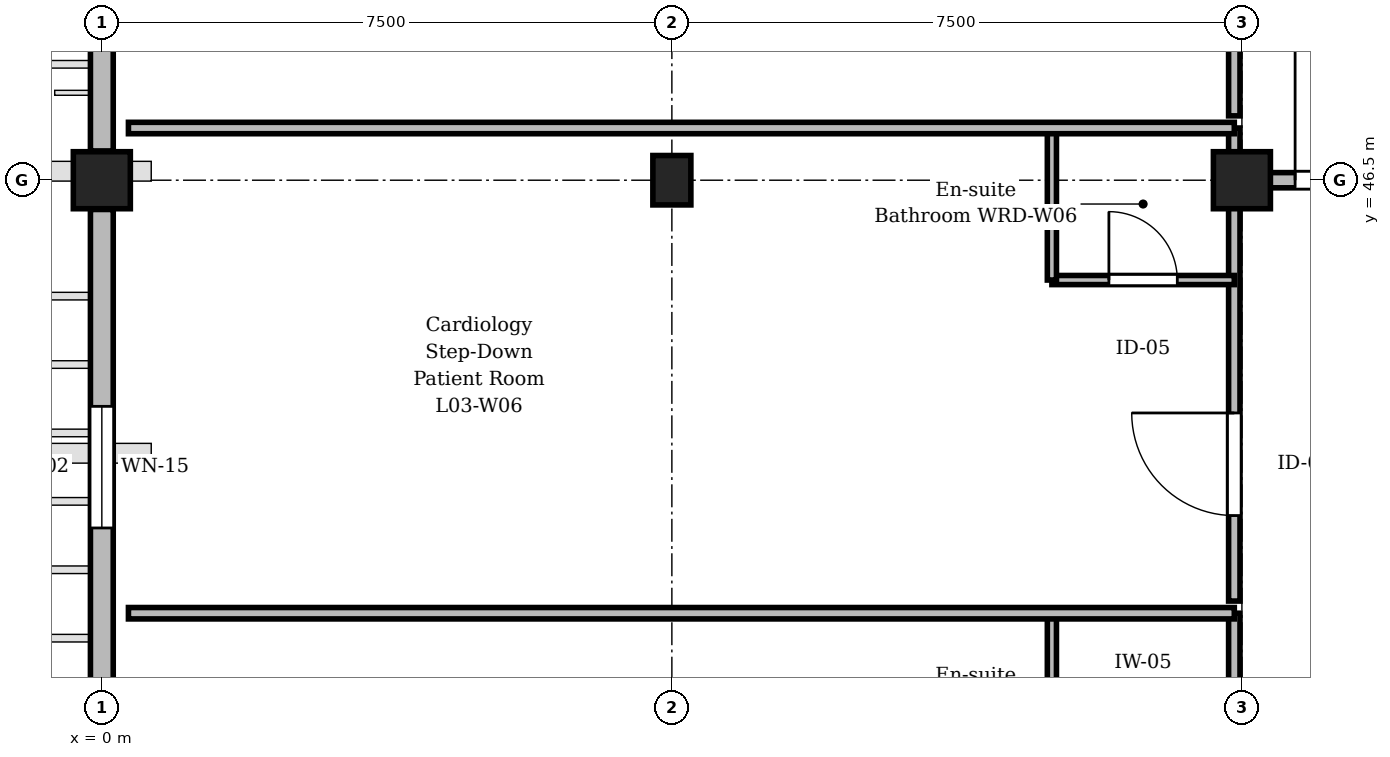
"""IFC4 building model, lengths in metres.
Left out: names, types, materials, properties, quantities, classifications, styles, units other than length and angle.
Written with IfcOpenShell. Run it as: python <this file> out.ifc"""

import sys

from ifc_helpers import new_model, si_unit, direction, frame, frame_2d, origin, origin_2d, place, context, subcontext, project, spatial, rectangle, extrude, element, fill, save


model = new_model("IFC4")
c1 = context("Model", 3, precision=1e-05, world=origin(), true_north=direction((0.0, 1.0)))
c2 = subcontext(c1, "Body", "Model", "MODEL_VIEW")
j1 = project(units=[si_unit("LENGTHUNIT", "METRE"), si_unit("PLANEANGLEUNIT", "RADIAN")], contexts=[c1])
p1 = place(None, origin())
s1 = spatial("IfcSite", under=j1, at=p1, CompositionType="ELEMENT")
p2 = place(p1, origin())
s2 = spatial("IfcBuilding", under=s1, at=p2, CompositionType="ELEMENT")
p3 = place(p2, frame((0.0, 0.0, 14.1)))
s3 = spatial("IfcBuildingStorey", under=s2, at=p3, CompositionType="ELEMENT", Elevation=14.1)
p4 = place(p3, frame((0.0, 46.5, 0.0), z_axis=(0.0, 0.0, 1.0), x_axis=(1.0, 0.0, 0.0)))
e1 = element("IfcColumn", 1, at=p4, inside=s3, PredefinedType="COLUMN", context=c2, shape_type="SweptSolid", body=[
    extrude(rectangle(XDim=0.75, YDim=0.75, at=origin_2d()), origin(), (0.0, 0.0, 1.0), 3.75),
])
p5 = place(p3, frame((7.5, 46.5, 0.0), z_axis=(0.0, 0.0, 1.0), x_axis=(1.0, 0.0, 0.0)))
e2 = element("IfcColumn", 2, at=p5, inside=s3, PredefinedType="COLUMN", context=c2, shape_type="SweptSolid", body=[
    extrude(rectangle(XDim=0.5, YDim=0.65, at=origin_2d()), origin(), (0.0, 0.0, 1.0), 3.75),
])
p6 = place(p3, frame((15.0, 46.5, 0.0), z_axis=(0.0, 0.0, 1.0), x_axis=(1.0, 0.0, 0.0)))
e3 = element("IfcColumn", 3, at=p6, inside=s3, PredefinedType="COLUMN", context=c2, shape_type="SweptSolid", body=[
    extrude(rectangle(XDim=0.75, YDim=0.75, at=origin_2d()), origin(), (0.0, 0.0, 1.0), 3.75),
])
p7 = place(p3, frame((0.0, 39.335, 0.0), z_axis=(0.0, 0.0, 1.0), x_axis=(0.0, 1.0, 0.0)))
e4 = element("IfcWall", 4, at=p7, inside=s3, PredefinedType="STANDARD", context=c2, shape_type="SweptSolid", body=[
    extrude(rectangle(XDim=6.78, YDim=0.3, at=frame_2d((3.39, 0.0))), origin(), (0.0, 0.0, 1.0), 2.87),
])
p8 = place(p7, frame((2.59, 0.0, 0.9)))
e5 = element("IfcOpeningElement", 5, at=p8, cuts=e4, PredefinedType="OPENING", context=c2, shape_type="SweptSolid", body=[
    extrude(rectangle(XDim=1.6, YDim=1.69, at=frame_2d((0.8, 0.845))), frame((0.0, 0.16, 0.0), z_axis=(0.0, -1.0, 0.0), x_axis=(1.0, 0.0, 0.0)), (0.0, 0.0, 1.0), 0.32),
])
p9 = place(p3, frame((0.0, 46.885, 0.0), z_axis=(0.0, 0.0, 1.0), x_axis=(0.0, 1.0, 0.0)))
e6 = element("IfcWall", 6, at=p9, inside=s3, PredefinedType="STANDARD", context=c2, shape_type="SweptSolid", body=[
    extrude(rectangle(XDim=6.78, YDim=0.3, at=frame_2d((3.39, 0.0))), origin(), (0.0, 0.0, 1.0), 2.87),
])
p10 = place(p9, frame((2.49, 0.0, 0.9)))
e7 = element("IfcOpeningElement", 7, at=p10, cuts=e6, PredefinedType="OPENING", context=c2, shape_type="SweptSolid", body=[
    extrude(rectangle(XDim=1.8, YDim=1.69, at=frame_2d((0.9, 0.845))), frame((0.0, 0.16, 0.0), z_axis=(0.0, -1.0, 0.0), x_axis=(1.0, 0.0, 0.0)), (0.0, 0.0, 1.0), 0.32),
])
p11 = place(p3, frame((14.9, 34.58, 0.0), z_axis=(0.0, 0.0, 1.0), x_axis=(0.0, 1.0, 0.0)))
e8 = element("IfcWall", 8, at=p11, inside=s3, PredefinedType="PARTITIONING", context=c2, shape_type="SweptSolid", body=[
    extrude(rectangle(XDim=6.223, YDim=0.15, at=frame_2d((3.112, 0.0))), origin(), (0.0, 0.0, 1.0), 2.905),
])
p12 = place(p11, frame((0.25, 0.0, 0.0)))
e9 = element("IfcOpeningElement", 9, at=p12, cuts=e8, PredefinedType="OPENING", context=c2, shape_type="SweptSolid", body=[
    extrude(rectangle(XDim=1.35, YDim=2.25, at=frame_2d((0.675, 1.125))), frame((0.0, 0.085, 0.0), z_axis=(0.0, -1.0, 0.0), x_axis=(1.0, 0.0, 0.0)), (0.0, 0.0, 1.0), 0.17),
])
p13 = place(p3, frame((12.5, 38.803, 0.0), z_axis=(0.0, 0.0, 1.0), x_axis=(0.0, 1.0, 0.0)))
e10 = element("IfcWall", 10, at=p13, inside=s3, PredefinedType="PARTITIONING", context=c2, shape_type="SweptSolid", body=[
    extrude(rectangle(XDim=2.0, YDim=0.12, at=frame_2d((1.0, 0.0))), origin(), (0.0, 0.0, 1.0), 3.455),
])
p14 = place(p3, frame((14.9, 40.963, 0.0), z_axis=(0.0, 0.0, 1.0), x_axis=(0.0, 1.0, 0.0)))
e11 = element("IfcWall", 11, at=p14, inside=s3, PredefinedType="PARTITIONING", context=c2, shape_type="SweptSolid", body=[
    extrude(rectangle(XDim=6.223, YDim=0.15, at=frame_2d((3.112, 0.0))), origin(), (0.0, 0.0, 1.0), 2.905),
])
p15 = place(p14, frame((1.125, 0.0, 0.0)))
e12 = element("IfcOpeningElement", 12, at=p15, cuts=e11, PredefinedType="OPENING", context=c2, shape_type="SweptSolid", body=[
    extrude(rectangle(XDim=1.35, YDim=2.25, at=frame_2d((0.675, 1.125))), frame((0.0, 0.085, 0.0), z_axis=(0.0, -1.0, 0.0), x_axis=(1.0, 0.0, 0.0)), (0.0, 0.0, 1.0), 0.17),
])
p16 = place(p3, frame((12.5, 45.187, 0.0), z_axis=(0.0, 0.0, 1.0), x_axis=(1.0, 0.0, 0.0)))
e13 = element("IfcWall", 13, at=p16, inside=s3, PredefinedType="PARTITIONING", context=c2, shape_type="SweptSolid", body=[
    extrude(rectangle(XDim=2.4, YDim=0.12, at=frame_2d((1.2, 0.0))), origin(), (0.0, 0.0, 1.0), 3.455),
])
p17 = place(p16, frame((0.75, 0.0, 0.0)))
e14 = element("IfcOpeningElement", 14, at=p17, cuts=e13, PredefinedType="OPENING", context=c2, shape_type="SweptSolid", body=[
    extrude(rectangle(XDim=0.9, YDim=2.1, at=frame_2d((0.45, 1.05))), frame((0.0, 0.07, 0.0), z_axis=(0.0, -1.0, 0.0), x_axis=(1.0, 0.0, 0.0)), (0.0, 0.0, 1.0), 0.14),
])
p18 = place(p3, frame((12.5, 45.187, 0.0), z_axis=(0.0, 0.0, 1.0), x_axis=(0.0, 1.0, 0.0)))
e15 = element("IfcWall", 15, at=p18, inside=s3, PredefinedType="PARTITIONING", context=c2, shape_type="SweptSolid", body=[
    extrude(rectangle(XDim=2.0, YDim=0.12, at=frame_2d((1.0, 0.0))), origin(), (0.0, 0.0, 1.0), 3.455),
])
p19 = place(p3, frame((14.9, 47.347, 0.0), z_axis=(0.0, 0.0, 1.0), x_axis=(0.0, 1.0, 0.0)))
e16 = element("IfcWall", 16, at=p19, inside=s3, PredefinedType="PARTITIONING", context=c2, shape_type="SweptSolid", body=[
    extrude(rectangle(XDim=6.223, YDim=0.15, at=frame_2d((3.112, 0.0))), origin(), (0.0, 0.0, 1.0), 2.905),
])
p20 = place(p19, frame((2.437, 0.0, 0.0)))
e17 = element("IfcOpeningElement", 17, at=p20, cuts=e16, PredefinedType="OPENING", context=c2, shape_type="SweptSolid", body=[
    extrude(rectangle(XDim=1.35, YDim=2.25, at=frame_2d((0.675, 1.125))), frame((0.0, 0.085, 0.0), z_axis=(0.0, -1.0, 0.0), x_axis=(1.0, 0.0, 0.0)), (0.0, 0.0, 1.0), 0.17),
])
for number, where, z_axis, x_axis in (
    (18, (0.35, 40.803, 0.0), (0.0, 0.0, 1.0), (1.0, 0.0, 0.0)),
    (19, (0.35, 47.187, 0.0), (0.0, 0.0, 1.0), (1.0, 0.0, 0.0)),
):
    element("IfcWall", number, at=place(p3, frame(where, z_axis=z_axis, x_axis=x_axis)), inside=s3, PredefinedType="PARTITIONING", context=c2, shape_type="SweptSolid", body=[
        extrude(rectangle(XDim=14.55, YDim=0.15, at=frame_2d((7.275, 0.0))), origin(), (0.0, 0.0, 1.0), 3.455),
    ])
p21 = place(p3, frame((15.2, 46.5, 0.0), z_axis=(0.0, 0.0, 1.0), x_axis=(1.0, 0.0, 0.0)))
e20 = element("IfcWall", 20, at=p21, inside=s3, PredefinedType="STANDARD", context=c2, shape_type="SweptSolid", body=[
    extrude(rectangle(XDim=3.0, YDim=0.2, at=frame_2d((1.5, 0.0))), origin(), (0.0, 0.0, 1.0), 2.855),
])
p22 = place(p21, frame((0.5, 0.0, 0.0)))
e21 = element("IfcOpeningElement", 21, at=p22, cuts=e20, PredefinedType="OPENING", context=c2, shape_type="SweptSolid", body=[
    extrude(rectangle(XDim=2.0, YDim=2.3, at=frame_2d((1.0, 1.15))), frame((0.0, 0.11, 0.0), z_axis=(0.0, -1.0, 0.0), x_axis=(1.0, 0.0, 0.0)), (0.0, 0.0, 1.0), 0.22),
])
p23 = place(p8, origin())
e22 = element("IfcWindow", 22, at=p23, inside=s3, PartitioningType="SINGLE_PANEL", PredefinedType="WINDOW", context=c2, shape_type="SweptSolid", body=[
    extrude(rectangle(XDim=1.6, YDim=1.69, at=frame_2d((0.8, 0.845))), frame((0.0, 0.03, 0.0), z_axis=(0.0, -1.0, 0.0), x_axis=(1.0, 0.0, 0.0)), (0.0, 0.0, 1.0), 0.06),
])
fill(e5, e22)
p24 = place(p15, origin())
e23 = element("IfcDoor", 23, at=p24, inside=s3, OperationType="SINGLE_SWING_RIGHT", PredefinedType="DOOR", context=c2, shape_type="SweptSolid", body=[
    extrude(rectangle(XDim=1.35, YDim=2.25, at=frame_2d((0.675, 1.125))), frame((0.0, 0.025, 0.0), z_axis=(0.0, -1.0, 0.0), x_axis=(1.0, 0.0, 0.0)), (0.0, 0.0, 1.0), 0.05),
])
fill(e12, e23)
p25 = place(p17, origin())
e24 = element("IfcDoor", 24, at=p25, inside=s3, OperationType="SINGLE_SWING_LEFT", PredefinedType="DOOR", context=c2, shape_type="SweptSolid", body=[
    extrude(rectangle(XDim=0.9, YDim=2.1, at=frame_2d((0.45, 1.05))), frame((0.0, 0.025, 0.0), z_axis=(0.0, -1.0, 0.0), x_axis=(1.0, 0.0, 0.0)), (0.0, 0.0, 1.0), 0.05),
])
fill(e14, e24)
p26 = place(p22, origin())
e25 = element("IfcDoor", 25, at=p26, inside=s3, OperationType="DOUBLE_DOOR_SINGLE_SWING", PredefinedType="DOOR", context=c2, shape_type="SweptSolid", body=[
    extrude(rectangle(XDim=2.0, YDim=2.3, at=frame_2d((1.0, 1.15))), frame((0.0, 0.025, 0.0), z_axis=(0.0, -1.0, 0.0), x_axis=(1.0, 0.0, 0.0)), (0.0, 0.0, 1.0), 0.05),
])
fill(e21, e25)
save(model, sys.argv[1])
